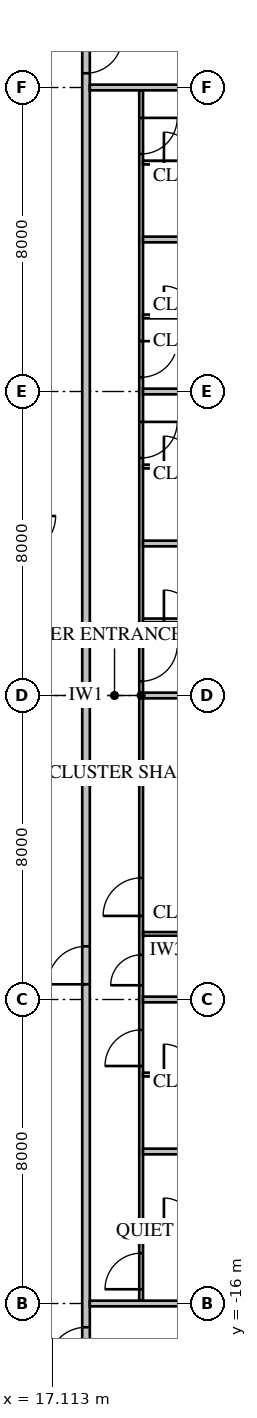
"""IFC4 building model, lengths in metres.
Left out: names, types, materials, properties, quantities, classifications, styles, units other than length and angle.
Written with IfcOpenShell. Run it as: python <this file> out.ifc"""

import sys

from ifc_helpers import new_model, si_unit, direction, frame, frame_2d, origin, place, context, subcontext, project, spatial, rectangle, extrude, element, fill, save


model = new_model("IFC4")
c1 = context("Model", 3, precision=1e-05, world=origin(), true_north=direction((0.0, 1.0)))
c2 = subcontext(c1, "Body", "Model", "MODEL_VIEW")
j1 = project(units=[si_unit("LENGTHUNIT", "METRE"), si_unit("PLANEANGLEUNIT", "RADIAN")], contexts=[c1])
p1 = place(None, origin())
s1 = spatial("IfcSite", under=j1, at=p1, CompositionType="ELEMENT")
p2 = place(p1, origin())
s2 = spatial("IfcBuilding", under=s1, at=p2, CompositionType="ELEMENT")
p3 = place(p2, frame((0.0, 0.0, 31.4)))
s3 = spatial("IfcBuildingStorey", under=s2, at=p3, CompositionType="ELEMENT", Elevation=31.4)
p4 = place(p3, frame((18.0, -18.0, 0.0), z_axis=(0.0, 0.0, 1.0), x_axis=(0.0, 1.0, 0.0)))
e1 = element("IfcWall", 1, at=p4, inside=s3, PredefinedType="PARTITIONING", context=c2, shape_type="SweptSolid", body=[
    extrude(rectangle(XDim=36.0, YDim=0.2, at=frame_2d((18.0, 0.0))), origin(), (0.0, 0.0, 1.0), 3.65),
])
p5 = place(p4, frame((10.4, 0.0, 0.0)))
e2 = element("IfcOpeningElement", 2, at=p5, cuts=e1, PredefinedType="OPENING", context=c2, shape_type="SweptSolid", body=[
    extrude(rectangle(XDim=1.0, YDim=2.1, at=frame_2d((0.5, 1.05))), frame((0.0, 0.12, 0.0), z_axis=(0.0, -1.0, 0.0), x_axis=(1.0, 0.0, 0.0)), (0.0, 0.0, 1.0), 0.24),
])
p6 = place(p4, frame((0.375, 0.0, 0.0)))
e3 = element("IfcOpeningElement", 3, at=p6, cuts=e1, PredefinedType="OPENING", context=c2, shape_type="SweptSolid", body=[
    extrude(rectangle(XDim=1.0, YDim=2.1, at=frame_2d((0.5, 1.05))), frame((0.0, 0.12, 0.0), z_axis=(0.0, -1.0, 0.0), x_axis=(1.0, 0.0, 0.0)), (0.0, 0.0, 1.0), 0.24),
])
p7 = place(p4, frame((34.375, 0.0, 0.0)))
e4 = element("IfcOpeningElement", 4, at=p7, cuts=e1, PredefinedType="OPENING", context=c2, shape_type="SweptSolid", body=[
    extrude(rectangle(XDim=0.95, YDim=2.1, at=frame_2d((0.475, 1.05))), frame((0.0, 0.12, 0.0), z_axis=(0.0, -1.0, 0.0), x_axis=(1.0, 0.0, 0.0)), (0.0, 0.0, 1.0), 0.24),
])
p8 = place(p3, frame((19.45, -15.925, 0.0), z_axis=(0.0, 0.0, 1.0), x_axis=(0.0, 1.0, 0.0)))
e5 = element("IfcWall", 5, at=p8, inside=s3, PredefinedType="PARTITIONING", context=c2, shape_type="SweptSolid", body=[
    extrude(rectangle(XDim=31.85, YDim=0.1, at=frame_2d((15.925, 0.0))), origin(), (0.0, 0.0, 1.0), 3.65),
])
p9 = place(p8, frame((10.125, 0.0, 0.0)))
e6 = element("IfcOpeningElement", 6, at=p9, cuts=e5, PredefinedType="OPENING", context=c2, shape_type="SweptSolid", body=[
    extrude(rectangle(XDim=1.0, YDim=2.1, at=frame_2d((0.5, 1.05))), frame((0.0, 0.07, 0.0), z_axis=(0.0, -1.0, 0.0), x_axis=(1.0, 0.0, 0.0)), (0.0, 0.0, 1.0), 0.14),
])
p10 = place(p8, frame((8.3, 0.0, 0.0)))
e7 = element("IfcOpeningElement", 7, at=p10, cuts=e5, PredefinedType="OPENING", context=c2, shape_type="SweptSolid", body=[
    extrude(rectangle(XDim=0.8, YDim=2.1, at=frame_2d((0.4, 1.05))), frame((0.0, 0.07, 0.0), z_axis=(0.0, -1.0, 0.0), x_axis=(1.0, 0.0, 0.0)), (0.0, 0.0, 1.0), 0.14),
])
p11 = place(p8, frame((0.3, 0.0, 0.0)))
e8 = element("IfcOpeningElement", 8, at=p11, cuts=e5, PredefinedType="OPENING", context=c2, shape_type="SweptSolid", body=[
    extrude(rectangle(XDim=0.95, YDim=2.1, at=frame_2d((0.475, 1.05))), frame((0.0, 0.07, 0.0), z_axis=(0.0, -1.0, 0.0), x_axis=(1.0, 0.0, 0.0)), (0.0, 0.0, 1.0), 0.14),
])
p12 = place(p8, frame((6.175, 0.0, 0.0)))
e9 = element("IfcOpeningElement", 9, at=p12, cuts=e5, PredefinedType="OPENING", context=c2, shape_type="SweptSolid", body=[
    extrude(rectangle(XDim=0.95, YDim=2.1, at=frame_2d((0.475, 1.05))), frame((0.0, 0.07, 0.0), z_axis=(0.0, -1.0, 0.0), x_axis=(1.0, 0.0, 0.0)), (0.0, 0.0, 1.0), 0.14),
])
p13 = place(p8, frame((16.3, 0.0, 0.0)))
e10 = element("IfcOpeningElement", 10, at=p13, cuts=e5, PredefinedType="OPENING", context=c2, shape_type="SweptSolid", body=[
    extrude(rectangle(XDim=0.95, YDim=2.1, at=frame_2d((0.475, 1.05))), frame((0.0, 0.07, 0.0), z_axis=(0.0, -1.0, 0.0), x_axis=(1.0, 0.0, 0.0)), (0.0, 0.0, 1.0), 0.14),
])
p14 = place(p8, frame((22.175, 0.0, 0.0)))
e11 = element("IfcOpeningElement", 11, at=p14, cuts=e5, PredefinedType="OPENING", context=c2, shape_type="SweptSolid", body=[
    extrude(rectangle(XDim=0.95, YDim=2.1, at=frame_2d((0.475, 1.05))), frame((0.0, 0.07, 0.0), z_axis=(0.0, -1.0, 0.0), x_axis=(1.0, 0.0, 0.0)), (0.0, 0.0, 1.0), 0.14),
])
p15 = place(p8, frame((24.3, 0.0, 0.0)))
e12 = element("IfcOpeningElement", 12, at=p15, cuts=e5, PredefinedType="OPENING", context=c2, shape_type="SweptSolid", body=[
    extrude(rectangle(XDim=0.95, YDim=2.1, at=frame_2d((0.475, 1.05))), frame((0.0, 0.07, 0.0), z_axis=(0.0, -1.0, 0.0), x_axis=(1.0, 0.0, 0.0)), (0.0, 0.0, 1.0), 0.14),
])
p16 = place(p8, frame((30.175, 0.0, 0.0)))
e13 = element("IfcOpeningElement", 13, at=p16, cuts=e5, PredefinedType="OPENING", context=c2, shape_type="SweptSolid", body=[
    extrude(rectangle(XDim=0.95, YDim=2.1, at=frame_2d((0.475, 1.05))), frame((0.0, 0.07, 0.0), z_axis=(0.0, -1.0, 0.0), x_axis=(1.0, 0.0, 0.0)), (0.0, 0.0, 1.0), 0.14),
])
p17 = place(p3, frame((19.5, -6.275, 0.0), z_axis=(0.0, 0.0, 1.0), x_axis=(1.0, 0.0, 0.0)))
e14 = element("IfcWall", 14, at=p17, inside=s3, PredefinedType="PARTITIONING", context=c2, shape_type="SweptSolid", body=[
    extrude(rectangle(XDim=2.1, YDim=0.1, at=frame_2d((1.05, 0.0))), origin(), (0.0, 0.0, 1.0), 3.65),
])
p18 = place(p3, frame((18.1, -16.0, 0.0), z_axis=(0.0, 0.0, 1.0), x_axis=(1.0, 0.0, 0.0)))
e15 = element("IfcWall", 15, at=p18, inside=s3, PredefinedType="PARTITIONING", context=c2, shape_type="SweptSolid", body=[
    extrude(rectangle(XDim=6.589, YDim=0.15, at=frame_2d((3.295, 0.0))), origin(), (0.0, 0.0, 1.0), 3.65),
])
for number, where, z_axis, x_axis in (
    (16, (19.5, -12.0, 0.0), (0.0, 0.0, 1.0), (1.0, 0.0, 0.0)),
    (17, (19.5, -8.0, 0.0), (0.0, 0.0, 1.0), (1.0, 0.0, 0.0)),
):
    element("IfcWall", number, at=place(p3, frame(where, z_axis=z_axis, x_axis=x_axis)), inside=s3, PredefinedType="PARTITIONING", context=c2, shape_type="SweptSolid", body=[
        extrude(rectangle(XDim=5.2, YDim=0.15, at=frame_2d((2.6, 0.0))), origin(), (0.0, 0.0, 1.0), 3.65),
    ])
p19 = place(p3, frame((19.5, 0.0, 0.0), z_axis=(0.0, 0.0, 1.0), x_axis=(1.0, 0.0, 0.0)))
e18 = element("IfcWall", 18, at=p19, inside=s3, PredefinedType="PARTITIONING", context=c2, shape_type="SweptSolid", body=[
    extrude(rectangle(XDim=5.2, YDim=0.15, at=frame_2d((2.6, 0.0))), origin(), (0.0, 0.0, 1.0), 2.957),
])
for number, where, z_axis, x_axis in (
    (19, (19.5, 4.0, 0.0), (0.0, 0.0, 1.0), (1.0, 0.0, 0.0)),
    (20, (19.5, 8.0, 0.0), (0.0, 0.0, 1.0), (1.0, 0.0, 0.0)),
    (21, (19.5, 12.0, 0.0), (0.0, 0.0, 1.0), (1.0, 0.0, 0.0)),
):
    element("IfcWall", number, at=place(p3, frame(where, z_axis=z_axis, x_axis=x_axis)), inside=s3, PredefinedType="PARTITIONING", context=c2, shape_type="SweptSolid", body=[
        extrude(rectangle(XDim=5.2, YDim=0.15, at=frame_2d((2.6, 0.0))), origin(), (0.0, 0.0, 1.0), 3.65),
    ])
p20 = place(p3, frame((18.1, 16.0, 0.0), z_axis=(0.0, 0.0, 1.0), x_axis=(1.0, 0.0, 0.0)))
e22 = element("IfcWall", 22, at=p20, inside=s3, PredefinedType="PARTITIONING", context=c2, shape_type="SweptSolid", body=[
    extrude(rectangle(XDim=6.589, YDim=0.15, at=frame_2d((3.295, 0.0))), origin(), (0.0, 0.0, 1.0), 3.65),
])
p21 = place(p3, frame((19.5, -14.025, 0.0), z_axis=(0.0, 0.0, 1.0), x_axis=(1.0, 0.0, 0.0)))
e23 = element("IfcWall", 23, at=p21, inside=s3, PredefinedType="PARTITIONING", context=c2, shape_type="SweptSolid", body=[
    extrude(rectangle(XDim=2.0, YDim=0.1, at=frame_2d((1.0, 0.0))), origin(), (0.0, 0.0, 1.0), 3.65),
])
p22 = place(p21, frame((0.55, 0.0, 0.0)))
e24 = element("IfcOpeningElement", 24, at=p22, cuts=e23, PredefinedType="OPENING", context=c2, shape_type="SweptSolid", body=[
    extrude(rectangle(XDim=0.8, YDim=2.1, at=frame_2d((0.4, 1.05))), frame((0.0, 0.07, 0.0), z_axis=(0.0, -1.0, 0.0), x_axis=(1.0, 0.0, 0.0)), (0.0, 0.0, 1.0), 0.14),
])
p23 = place(p3, frame((19.5, -9.975, 0.0), z_axis=(0.0, 0.0, 1.0), x_axis=(1.0, 0.0, 0.0)))
e25 = element("IfcWall", 25, at=p23, inside=s3, PredefinedType="PARTITIONING", context=c2, shape_type="SweptSolid", body=[
    extrude(rectangle(XDim=2.0, YDim=0.1, at=frame_2d((1.0, 0.0))), origin(), (0.0, 0.0, 1.0), 3.65),
])
p24 = place(p23, frame((0.55, 0.0, 0.0)))
e26 = element("IfcOpeningElement", 26, at=p24, cuts=e25, PredefinedType="OPENING", context=c2, shape_type="SweptSolid", body=[
    extrude(rectangle(XDim=0.8, YDim=2.1, at=frame_2d((0.4, 1.05))), frame((0.0, 0.07, 0.0), z_axis=(0.0, -1.0, 0.0), x_axis=(1.0, 0.0, 0.0)), (0.0, 0.0, 1.0), 0.14),
])
p25 = place(p3, frame((19.5, 1.975, 0.0), z_axis=(0.0, 0.0, 1.0), x_axis=(1.0, 0.0, 0.0)))
e27 = element("IfcWall", 27, at=p25, inside=s3, PredefinedType="PARTITIONING", context=c2, shape_type="SweptSolid", body=[
    extrude(rectangle(XDim=2.0, YDim=0.1, at=frame_2d((1.0, 0.0))), origin(), (0.0, 0.0, 1.0), 3.65),
])
p26 = place(p25, frame((0.55, 0.0, 0.0)))
e28 = element("IfcOpeningElement", 28, at=p26, cuts=e27, PredefinedType="OPENING", context=c2, shape_type="SweptSolid", body=[
    extrude(rectangle(XDim=0.8, YDim=2.1, at=frame_2d((0.4, 1.05))), frame((0.0, 0.07, 0.0), z_axis=(0.0, -1.0, 0.0), x_axis=(1.0, 0.0, 0.0)), (0.0, 0.0, 1.0), 0.14),
])
p27 = place(p3, frame((19.5, 6.025, 0.0), z_axis=(0.0, 0.0, 1.0), x_axis=(1.0, 0.0, 0.0)))
e29 = element("IfcWall", 29, at=p27, inside=s3, PredefinedType="PARTITIONING", context=c2, shape_type="SweptSolid", body=[
    extrude(rectangle(XDim=2.0, YDim=0.1, at=frame_2d((1.0, 0.0))), origin(), (0.0, 0.0, 1.0), 3.65),
])
p28 = place(p27, frame((0.55, 0.0, 0.0)))
e30 = element("IfcOpeningElement", 30, at=p28, cuts=e29, PredefinedType="OPENING", context=c2, shape_type="SweptSolid", body=[
    extrude(rectangle(XDim=0.8, YDim=2.1, at=frame_2d((0.4, 1.05))), frame((0.0, 0.07, 0.0), z_axis=(0.0, -1.0, 0.0), x_axis=(1.0, 0.0, 0.0)), (0.0, 0.0, 1.0), 0.14),
])
p29 = place(p3, frame((19.5, 9.975, 0.0), z_axis=(0.0, 0.0, 1.0), x_axis=(1.0, 0.0, 0.0)))
e31 = element("IfcWall", 31, at=p29, inside=s3, PredefinedType="PARTITIONING", context=c2, shape_type="SweptSolid", body=[
    extrude(rectangle(XDim=2.0, YDim=0.1, at=frame_2d((1.0, 0.0))), origin(), (0.0, 0.0, 1.0), 3.65),
])
p30 = place(p29, frame((0.55, 0.0, 0.0)))
e32 = element("IfcOpeningElement", 32, at=p30, cuts=e31, PredefinedType="OPENING", context=c2, shape_type="SweptSolid", body=[
    extrude(rectangle(XDim=0.8, YDim=2.1, at=frame_2d((0.4, 1.05))), frame((0.0, 0.07, 0.0), z_axis=(0.0, -1.0, 0.0), x_axis=(1.0, 0.0, 0.0)), (0.0, 0.0, 1.0), 0.14),
])
p31 = place(p3, frame((19.5, 14.025, 0.0), z_axis=(0.0, 0.0, 1.0), x_axis=(1.0, 0.0, 0.0)))
e33 = element("IfcWall", 33, at=p31, inside=s3, PredefinedType="PARTITIONING", context=c2, shape_type="SweptSolid", body=[
    extrude(rectangle(XDim=2.0, YDim=0.1, at=frame_2d((1.0, 0.0))), origin(), (0.0, 0.0, 1.0), 3.65),
])
p32 = place(p31, frame((0.55, 0.0, 0.0)))
e34 = element("IfcOpeningElement", 34, at=p32, cuts=e33, PredefinedType="OPENING", context=c2, shape_type="SweptSolid", body=[
    extrude(rectangle(XDim=0.8, YDim=2.1, at=frame_2d((0.4, 1.05))), frame((0.0, 0.07, 0.0), z_axis=(0.0, -1.0, 0.0), x_axis=(1.0, 0.0, 0.0)), (0.0, 0.0, 1.0), 0.14),
])
p33 = place(p5, origin())
e35 = element("IfcDoor", 35, at=p33, inside=s3, OperationType="SINGLE_SWING_LEFT", PredefinedType="DOOR", context=c2, shape_type="SweptSolid", body=[
    extrude(rectangle(XDim=1.0, YDim=2.1, at=frame_2d((0.5, 1.05))), frame((0.0, 0.025, 0.0), z_axis=(0.0, -1.0, 0.0), x_axis=(1.0, 0.0, 0.0)), (0.0, 0.0, 1.0), 0.05),
])
fill(e2, e35)
p34 = place(p9, origin())
e36 = element("IfcDoor", 36, at=p34, inside=s3, OperationType="SINGLE_SWING_LEFT", PredefinedType="DOOR", context=c2, shape_type="SweptSolid", body=[
    extrude(rectangle(XDim=1.0, YDim=2.1, at=frame_2d((0.5, 1.05))), frame((0.0, 0.025, 0.0), z_axis=(0.0, -1.0, 0.0), x_axis=(1.0, 0.0, 0.0)), (0.0, 0.0, 1.0), 0.05),
])
fill(e6, e36)
p35 = place(p10, origin())
e37 = element("IfcDoor", 37, at=p35, inside=s3, OperationType="SINGLE_SWING_LEFT", PredefinedType="DOOR", context=c2, shape_type="SweptSolid", body=[
    extrude(rectangle(XDim=0.8, YDim=2.1, at=frame_2d((0.4, 1.05))), frame((0.0, 0.025, 0.0), z_axis=(0.0, -1.0, 0.0), x_axis=(1.0, 0.0, 0.0)), (0.0, 0.0, 1.0), 0.05),
])
fill(e7, e37)
p36 = place(p6, origin())
e38 = element("IfcDoor", 38, at=p36, inside=s3, OperationType="SINGLE_SWING_LEFT", PredefinedType="DOOR", context=c2, shape_type="SweptSolid", body=[
    extrude(rectangle(XDim=1.0, YDim=2.1, at=frame_2d((0.5, 1.05))), frame((0.0, 0.025, 0.0), z_axis=(0.0, -1.0, 0.0), x_axis=(1.0, 0.0, 0.0)), (0.0, 0.0, 1.0), 0.05),
])
fill(e3, e38)
p37 = place(p11, origin())
e39 = element("IfcDoor", 39, at=p37, inside=s3, OperationType="SINGLE_SWING_LEFT", PredefinedType="DOOR", context=c2, shape_type="SweptSolid", body=[
    extrude(rectangle(XDim=0.95, YDim=2.1, at=frame_2d((0.475, 1.05))), frame((0.0, 0.025, 0.0), z_axis=(0.0, -1.0, 0.0), x_axis=(1.0, 0.0, 0.0)), (0.0, 0.0, 1.0), 0.05),
])
fill(e8, e39)
p38 = place(p22, origin())
e40 = element("IfcDoor", 40, at=p38, inside=s3, OperationType="SINGLE_SWING_LEFT", PredefinedType="DOOR", context=c2, shape_type="SweptSolid", body=[
    extrude(rectangle(XDim=0.8, YDim=2.1, at=frame_2d((0.4, 1.05))), frame((0.0, 0.025, 0.0), z_axis=(0.0, -1.0, 0.0), x_axis=(1.0, 0.0, 0.0)), (0.0, 0.0, 1.0), 0.05),
])
fill(e24, e40)
p39 = place(p12, origin())
e41 = element("IfcDoor", 41, at=p39, inside=s3, OperationType="SINGLE_SWING_LEFT", PredefinedType="DOOR", context=c2, shape_type="SweptSolid", body=[
    extrude(rectangle(XDim=0.95, YDim=2.1, at=frame_2d((0.475, 1.05))), frame((0.0, 0.025, 0.0), z_axis=(0.0, -1.0, 0.0), x_axis=(1.0, 0.0, 0.0)), (0.0, 0.0, 1.0), 0.05),
])
fill(e9, e41)
p40 = place(p24, origin())
e42 = element("IfcDoor", 42, at=p40, inside=s3, OperationType="SINGLE_SWING_LEFT", PredefinedType="DOOR", context=c2, shape_type="SweptSolid", body=[
    extrude(rectangle(XDim=0.8, YDim=2.1, at=frame_2d((0.4, 1.05))), frame((0.0, 0.025, 0.0), z_axis=(0.0, -1.0, 0.0), x_axis=(1.0, 0.0, 0.0)), (0.0, 0.0, 1.0), 0.05),
])
fill(e26, e42)
p41 = place(p13, origin())
e43 = element("IfcDoor", 43, at=p41, inside=s3, OperationType="SINGLE_SWING_RIGHT", PredefinedType="DOOR", context=c2, shape_type="SweptSolid", body=[
    extrude(rectangle(XDim=0.95, YDim=2.1, at=frame_2d((0.475, 1.05))), frame((0.0, 0.025, 0.0), z_axis=(0.0, -1.0, 0.0), x_axis=(1.0, 0.0, 0.0)), (0.0, 0.0, 1.0), 0.05),
])
fill(e10, e43)
p42 = place(p26, origin())
e44 = element("IfcDoor", 44, at=p42, inside=s3, OperationType="SINGLE_SWING_LEFT", PredefinedType="DOOR", context=c2, shape_type="SweptSolid", body=[
    extrude(rectangle(XDim=0.8, YDim=2.1, at=frame_2d((0.4, 1.05))), frame((0.0, 0.025, 0.0), z_axis=(0.0, -1.0, 0.0), x_axis=(1.0, 0.0, 0.0)), (0.0, 0.0, 1.0), 0.05),
])
fill(e28, e44)
p43 = place(p14, origin())
e45 = element("IfcDoor", 45, at=p43, inside=s3, OperationType="SINGLE_SWING_RIGHT", PredefinedType="DOOR", context=c2, shape_type="SweptSolid", body=[
    extrude(rectangle(XDim=0.95, YDim=2.1, at=frame_2d((0.475, 1.05))), frame((0.0, 0.025, 0.0), z_axis=(0.0, -1.0, 0.0), x_axis=(1.0, 0.0, 0.0)), (0.0, 0.0, 1.0), 0.05),
])
fill(e11, e45)
p44 = place(p28, origin())
e46 = element("IfcDoor", 46, at=p44, inside=s3, OperationType="SINGLE_SWING_LEFT", PredefinedType="DOOR", context=c2, shape_type="SweptSolid", body=[
    extrude(rectangle(XDim=0.8, YDim=2.1, at=frame_2d((0.4, 1.05))), frame((0.0, 0.025, 0.0), z_axis=(0.0, -1.0, 0.0), x_axis=(1.0, 0.0, 0.0)), (0.0, 0.0, 1.0), 0.05),
])
fill(e30, e46)
p45 = place(p15, origin())
e47 = element("IfcDoor", 47, at=p45, inside=s3, OperationType="SINGLE_SWING_RIGHT", PredefinedType="DOOR", context=c2, shape_type="SweptSolid", body=[
    extrude(rectangle(XDim=0.95, YDim=2.1, at=frame_2d((0.475, 1.05))), frame((0.0, 0.025, 0.0), z_axis=(0.0, -1.0, 0.0), x_axis=(1.0, 0.0, 0.0)), (0.0, 0.0, 1.0), 0.05),
])
fill(e12, e47)
p46 = place(p30, origin())
e48 = element("IfcDoor", 48, at=p46, inside=s3, OperationType="SINGLE_SWING_LEFT", PredefinedType="DOOR", context=c2, shape_type="SweptSolid", body=[
    extrude(rectangle(XDim=0.8, YDim=2.1, at=frame_2d((0.4, 1.05))), frame((0.0, 0.025, 0.0), z_axis=(0.0, -1.0, 0.0), x_axis=(1.0, 0.0, 0.0)), (0.0, 0.0, 1.0), 0.05),
])
fill(e32, e48)
p47 = place(p16, origin())
e49 = element("IfcDoor", 49, at=p47, inside=s3, OperationType="SINGLE_SWING_RIGHT", PredefinedType="DOOR", context=c2, shape_type="SweptSolid", body=[
    extrude(rectangle(XDim=0.95, YDim=2.1, at=frame_2d((0.475, 1.05))), frame((0.0, 0.025, 0.0), z_axis=(0.0, -1.0, 0.0), x_axis=(1.0, 0.0, 0.0)), (0.0, 0.0, 1.0), 0.05),
])
fill(e13, e49)
p48 = place(p32, origin())
e50 = element("IfcDoor", 50, at=p48, inside=s3, OperationType="SINGLE_SWING_LEFT", PredefinedType="DOOR", context=c2, shape_type="SweptSolid", body=[
    extrude(rectangle(XDim=0.8, YDim=2.1, at=frame_2d((0.4, 1.05))), frame((0.0, 0.025, 0.0), z_axis=(0.0, -1.0, 0.0), x_axis=(1.0, 0.0, 0.0)), (0.0, 0.0, 1.0), 0.05),
])
fill(e34, e50)
p49 = place(p7, origin())
e51 = element("IfcDoor", 51, at=p49, inside=s3, OperationType="SINGLE_SWING_RIGHT", PredefinedType="DOOR", context=c2, shape_type="SweptSolid", body=[
    extrude(rectangle(XDim=0.95, YDim=2.1, at=frame_2d((0.475, 1.05))), frame((0.0, 0.025, 0.0), z_axis=(0.0, -1.0, 0.0), x_axis=(1.0, 0.0, 0.0)), (0.0, 0.0, 1.0), 0.05),
])
fill(e4, e51)
save(model, sys.argv[1])
